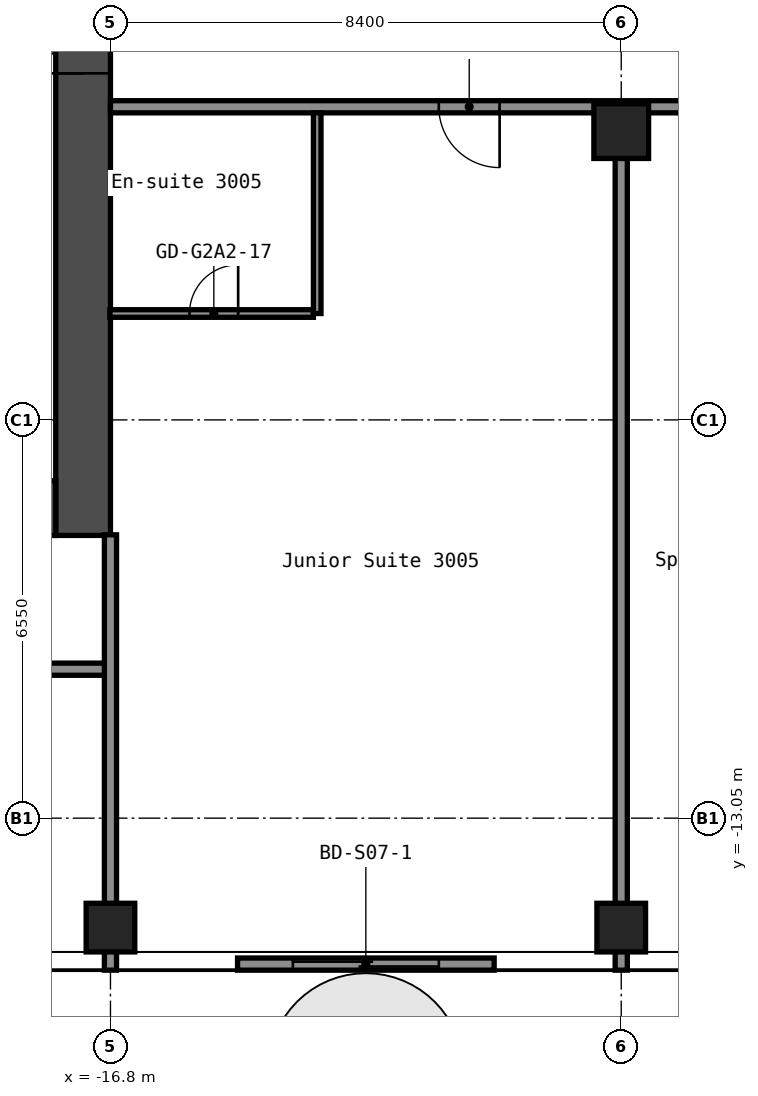
"""IFC4 building model, lengths in metres.
Left out: names, types, materials, properties, quantities, classifications, styles, units other than length and angle.
Written with IfcOpenShell. Run it as: python <this file> out.ifc"""

import sys

from ifc_helpers import new_model, si_unit, direction, frame, frame_2d, origin, origin_2d, place, context, subcontext, project, spatial, rectangle, hollow_rectangle, extrude, element, fill, save


model = new_model("IFC4")
c1 = context("Model", 3, precision=1e-05, world=origin(), true_north=direction((0.0, 1.0)))
c2 = subcontext(c1, "Body", "Model", "MODEL_VIEW")
j1 = project(units=[si_unit("LENGTHUNIT", "METRE"), si_unit("PLANEANGLEUNIT", "RADIAN")], contexts=[c1])
p1 = place(None, origin())
s1 = spatial("IfcSite", under=j1, at=p1, CompositionType="ELEMENT")
p2 = place(p1, origin())
s2 = spatial("IfcBuilding", under=s1, at=p2, CompositionType="ELEMENT")
p3 = place(p2, frame((0.0, 0.0, 107.4)))
s3 = spatial("IfcBuildingStorey", under=s2, at=p3, CompositionType="ELEMENT", Elevation=107.4)
for number, where, z_axis, x_axis in (
    (1, (-16.8, -14.85, 0.0), (0.0, 0.0, 1.0), (1.0, 0.0, 0.0)),
    (2, (-8.4, -14.85, 0.0), (0.0, 0.0, 1.0), (1.0, 0.0, 0.0)),
):
    element("IfcColumn", number, at=place(p3, frame(where, z_axis=z_axis, x_axis=x_axis)), inside=s3, PredefinedType="COLUMN", context=c2, shape_type="SweptSolid", body=[
        extrude(hollow_rectangle(XDim=0.8, YDim=0.8, WallThickness=0.032, at=origin_2d()), origin(), (0.0, 0.0, 1.0), 2.8),
    ])
p4 = place(p3, frame((-8.4, -1.75, 0.0), z_axis=(0.0, 0.0, 1.0), x_axis=(1.0, 0.0, 0.0)))
e3 = element("IfcColumn", 3, at=p4, inside=s3, PredefinedType="COLUMN", context=c2, shape_type="SweptSolid", body=[
    extrude(hollow_rectangle(XDim=0.9, YDim=0.9, WallThickness=0.036, at=origin_2d()), origin(), (0.0, 0.0, 1.0), 2.8),
])
p5 = place(p3, frame((-17.25, -8.4, 0.0), z_axis=(0.0, 0.0, 1.0), x_axis=(0.0, 1.0, 0.0)))
e4 = element("IfcWall", 4, at=p5, inside=s3, PredefinedType="SHEAR", context=c2, shape_type="SweptSolid", body=[
    extrude(rectangle(XDim=16.8, YDim=0.9, at=frame_2d((8.4, 0.0))), origin(), (0.0, 0.0, 1.0), 2.8),
])
p6 = place(p5, frame((7.6, 0.0, 0.0)))
e5 = element("IfcOpeningElement", 5, at=p6, cuts=e4, PredefinedType="OPENING", context=c2, shape_type="SweptSolid", body=[
    extrude(rectangle(XDim=1.2, YDim=2.1, at=frame_2d((0.6, 1.05))), frame((0.0, 0.46, 0.0), z_axis=(0.0, -1.0, 0.0), x_axis=(1.0, 0.0, 0.0)), (0.0, 0.0, 1.0), 0.92),
])
p7 = place(p3, frame((-32.7, -7.95, 0.0), z_axis=(0.0, 0.0, 1.0), x_axis=(1.0, 0.0, 0.0)))
e6 = element("IfcWall", 6, at=p7, inside=s3, PredefinedType="SHEAR", context=c2, shape_type="SweptSolid", body=[
    extrude(rectangle(XDim=15.0, YDim=0.9, at=frame_2d((7.5, 0.0))), origin(), (0.0, 0.0, 1.0), 2.8),
])
p8 = place(p7, frame((11.45, 0.0, 0.0)))
e7 = element("IfcOpeningElement", 7, at=p8, cuts=e6, PredefinedType="OPENING", context=c2, shape_type="SweptSolid", body=[
    extrude(rectangle(XDim=1.0, YDim=2.1, at=frame_2d((0.5, 1.05))), frame((0.0, 0.46, 0.0), z_axis=(0.0, -1.0, 0.0), x_axis=(1.0, 0.0, 0.0)), (0.0, 0.0, 1.0), 0.92),
])
p9 = place(p3, frame((-46.5, -10.6, 0.0), z_axis=(0.0, 0.0, 1.0), x_axis=(1.0, 0.0, 0.0)))
e8 = element("IfcWall", 8, at=p9, inside=s3, PredefinedType="PARTITIONING", context=c2, shape_type="SweptSolid", body=[
    extrude(rectangle(XDim=29.7, YDim=0.2, at=frame_2d((14.85, 0.0))), origin(), (0.0, 0.0, 1.0), 2.8),
])
p10 = place(p9, frame((1.95, 0.0, 0.0)))
e9 = element("IfcOpeningElement", 9, at=p10, cuts=e8, PredefinedType="OPENING", context=c2, shape_type="SweptSolid", body=[
    extrude(rectangle(XDim=0.9, YDim=2.1, at=frame_2d((0.45, 1.05))), frame((0.0, 0.11, 0.0), z_axis=(0.0, -1.0, 0.0), x_axis=(1.0, 0.0, 0.0)), (0.0, 0.0, 1.0), 0.22),
])
p11 = place(p9, frame((6.74, 0.0, 0.0)))
e10 = element("IfcOpeningElement", 10, at=p11, cuts=e8, PredefinedType="OPENING", context=c2, shape_type="SweptSolid", body=[
    extrude(rectangle(XDim=0.9, YDim=2.1, at=frame_2d((0.45, 1.05))), frame((0.0, 0.11, 0.0), z_axis=(0.0, -1.0, 0.0), x_axis=(1.0, 0.0, 0.0)), (0.0, 0.0, 1.0), 0.22),
])
p12 = place(p9, frame((10.94, 0.0, 0.0)))
e11 = element("IfcOpeningElement", 11, at=p12, cuts=e8, PredefinedType="OPENING", context=c2, shape_type="SweptSolid", body=[
    extrude(rectangle(XDim=0.9, YDim=2.1, at=frame_2d((0.45, 1.05))), frame((0.0, 0.11, 0.0), z_axis=(0.0, -1.0, 0.0), x_axis=(1.0, 0.0, 0.0)), (0.0, 0.0, 1.0), 0.22),
])
p13 = place(p9, frame((15.055, 0.0, 0.0)))
e12 = element("IfcOpeningElement", 12, at=p13, cuts=e8, PredefinedType="OPENING", context=c2, shape_type="SweptSolid", body=[
    extrude(rectangle(XDim=0.9, YDim=2.1, at=frame_2d((0.45, 1.05))), frame((0.0, 0.11, 0.0), z_axis=(0.0, -1.0, 0.0), x_axis=(1.0, 0.0, 0.0)), (0.0, 0.0, 1.0), 0.22),
])
p14 = place(p9, frame((19.255, 0.0, 0.0)))
e13 = element("IfcOpeningElement", 13, at=p14, cuts=e8, PredefinedType="OPENING", context=c2, shape_type="SweptSolid", body=[
    extrude(rectangle(XDim=0.9, YDim=2.1, at=frame_2d((0.45, 1.05))), frame((0.0, 0.11, 0.0), z_axis=(0.0, -1.0, 0.0), x_axis=(1.0, 0.0, 0.0)), (0.0, 0.0, 1.0), 0.22),
])
p15 = place(p9, frame((25.0, 0.0, 0.0)))
e14 = element("IfcOpeningElement", 14, at=p15, cuts=e8, PredefinedType="OPENING", context=c2, shape_type="SweptSolid", body=[
    extrude(rectangle(XDim=1.0, YDim=2.1, at=frame_2d((0.5, 1.05))), frame((0.0, 0.11, 0.0), z_axis=(0.0, -1.0, 0.0), x_axis=(1.0, 0.0, 0.0)), (0.0, 0.0, 1.0), 0.22),
])
p16 = place(p3, frame((-16.81, -4.75, 0.0), z_axis=(0.0, 0.0, 1.0), x_axis=(1.0, 0.0, 0.0)))
e15 = element("IfcWall", 15, at=p16, inside=s3, PredefinedType="PARTITIONING", context=c2, shape_type="SweptSolid", body=[
    extrude(rectangle(XDim=3.348, YDim=0.125, at=frame_2d((1.674, 0.0))), origin(), (0.0, 0.0, 1.0), 2.8),
])
p17 = place(p16, frame((1.31, 0.0, 0.0)))
e16 = element("IfcOpeningElement", 16, at=p17, cuts=e15, PredefinedType="OPENING", context=c2, shape_type="SweptSolid", body=[
    extrude(rectangle(XDim=0.8, YDim=2.1, at=frame_2d((0.4, 1.05))), frame((0.0, 0.073, 0.0), z_axis=(0.0, -1.0, 0.0), x_axis=(1.0, 0.0, 0.0)), (0.0, 0.0, 1.0), 0.145),
])
p18 = place(p3, frame((-16.8, -1.35, 0.0), z_axis=(0.0, 0.0, 1.0), x_axis=(1.0, 0.0, 0.0)))
e17 = element("IfcWall", 17, at=p18, inside=s3, PredefinedType="PARTITIONING", context=c2, shape_type="SweptSolid", body=[
    extrude(rectangle(XDim=33.6, YDim=0.2, at=frame_2d((16.8, 0.0))), origin(), (0.0, 0.0, 1.0), 2.8),
])
p19 = place(p18, frame((5.4, 0.0, 0.0)))
e18 = element("IfcOpeningElement", 18, at=p19, cuts=e17, PredefinedType="OPENING", context=c2, shape_type="SweptSolid", body=[
    extrude(rectangle(XDim=1.0, YDim=2.1, at=frame_2d((0.5, 1.05))), frame((0.0, 0.11, 0.0), z_axis=(0.0, -1.0, 0.0), x_axis=(1.0, 0.0, 0.0)), (0.0, 0.0, 1.0), 0.22),
])
p20 = place(p18, frame((9.46, 0.0, 0.0)))
e19 = element("IfcOpeningElement", 19, at=p20, cuts=e17, PredefinedType="OPENING", context=c2, shape_type="SweptSolid", body=[
    extrude(rectangle(XDim=0.9, YDim=2.1, at=frame_2d((0.45, 1.05))), frame((0.0, 0.11, 0.0), z_axis=(0.0, -1.0, 0.0), x_axis=(1.0, 0.0, 0.0)), (0.0, 0.0, 1.0), 0.22),
])
p21 = place(p18, frame((13.66, 0.0, 0.0)))
e20 = element("IfcOpeningElement", 20, at=p21, cuts=e17, PredefinedType="OPENING", context=c2, shape_type="SweptSolid", body=[
    extrude(rectangle(XDim=0.9, YDim=2.1, at=frame_2d((0.45, 1.05))), frame((0.0, 0.11, 0.0), z_axis=(0.0, -1.0, 0.0), x_axis=(1.0, 0.0, 0.0)), (0.0, 0.0, 1.0), 0.22),
])
p22 = place(p18, frame((18.8, 0.0, 0.0)))
e21 = element("IfcOpeningElement", 21, at=p22, cuts=e17, PredefinedType="OPENING", context=c2, shape_type="SweptSolid", body=[
    extrude(rectangle(XDim=1.0, YDim=2.1, at=frame_2d((0.5, 1.05))), frame((0.0, 0.11, 0.0), z_axis=(0.0, -1.0, 0.0), x_axis=(1.0, 0.0, 0.0)), (0.0, 0.0, 1.0), 0.22),
])
p23 = place(p18, frame((30.6, 0.0, 0.0)))
e22 = element("IfcOpeningElement", 22, at=p23, cuts=e17, PredefinedType="OPENING", context=c2, shape_type="SweptSolid", body=[
    extrude(rectangle(XDim=1.0, YDim=2.1, at=frame_2d((0.5, 1.05))), frame((0.0, 0.11, 0.0), z_axis=(0.0, -1.0, 0.0), x_axis=(1.0, 0.0, 0.0)), (0.0, 0.0, 1.0), 0.22),
])
p24 = place(p3, frame((-16.8, -15.55, 0.0), z_axis=(0.0, 0.0, 1.0), x_axis=(0.0, 1.0, 0.0)))
e23 = element("IfcWall", 23, at=p24, inside=s3, PredefinedType="PARTITIONING", context=c2, shape_type="SweptSolid", body=[
    extrude(rectangle(XDim=7.16, YDim=0.2, at=frame_2d((3.58, 0.0))), origin(), (0.0, 0.0, 1.0), 2.8),
])
p25 = place(p3, frame((-13.4, -4.75, 0.0), z_axis=(0.0, 0.0, 1.0), x_axis=(0.0, 1.0, 0.0)))
e24 = element("IfcWall", 24, at=p25, inside=s3, PredefinedType="PARTITIONING", context=c2, shape_type="SweptSolid", body=[
    extrude(rectangle(XDim=3.3, YDim=0.125, at=frame_2d((1.65, 0.0))), origin(), (0.0, 0.0, 1.0), 2.8),
])
p26 = place(p3, frame((-8.4, -15.55, 0.0), z_axis=(0.0, 0.0, 1.0), x_axis=(0.0, 1.0, 0.0)))
e25 = element("IfcWall", 25, at=p26, inside=s3, PredefinedType="PARTITIONING", context=c2, shape_type="SweptSolid", body=[
    extrude(rectangle(XDim=13.36, YDim=0.2, at=frame_2d((6.68, 0.0))), origin(), (0.0, 0.0, 1.0), 2.8),
])
p27 = place(p3, frame((-14.71, -15.45, 0.0), z_axis=(0.0, 0.0, 1.0), x_axis=(1.0, 0.0, 0.0)))
p28 = place(p27, frame((0.91, 0.0, 0.0)))
p29 = place(p28, frame((2.4, 0.0, 0.0), z_axis=(0.0, 0.0, 1.0), x_axis=(-1.0, 0.0, 0.0)))
e26 = element("IfcDoor", 26, at=p29, inside=s3, OperationType="SLIDING_TO_LEFT", PredefinedType="DOOR", context=c2, shape_type="SweptSolid", body=[
    extrude(rectangle(XDim=2.4, YDim=2.2, at=frame_2d((1.2, 1.1))), frame((0.0, 0.025, 0.0), z_axis=(0.0, -1.0, 0.0), x_axis=(1.0, 0.0, 0.0)), (0.0, 0.0, 1.0), 0.05),
])
p30 = place(p6, origin())
e27 = element("IfcDoor", 27, at=p30, inside=s3, OperationType="DOUBLE_DOOR_SINGLE_SWING", PredefinedType="DOOR", context=c2, shape_type="SweptSolid", body=[
    extrude(rectangle(XDim=1.2, YDim=2.1, at=frame_2d((0.6, 1.05))), frame((0.0, 0.025, 0.0), z_axis=(0.0, -1.0, 0.0), x_axis=(1.0, 0.0, 0.0)), (0.0, 0.0, 1.0), 0.05),
])
fill(e5, e27)
p31 = place(p17, origin())
e28 = element("IfcDoor", 28, at=p31, inside=s3, OperationType="SINGLE_SWING_LEFT", PredefinedType="DOOR", context=c2, shape_type="SweptSolid", body=[
    extrude(rectangle(XDim=0.8, YDim=2.1, at=frame_2d((0.4, 1.05))), frame((0.0, 0.025, 0.0), z_axis=(0.0, -1.0, 0.0), x_axis=(1.0, 0.0, 0.0)), (0.0, 0.0, 1.0), 0.05),
])
fill(e16, e28)
p32 = place(p19, origin())
e29 = element("IfcDoor", 29, at=p32, inside=s3, OperationType="SINGLE_SWING_RIGHT", PredefinedType="DOOR", context=c2, shape_type="SweptSolid", body=[
    extrude(rectangle(XDim=1.0, YDim=2.1, at=frame_2d((0.5, 1.05))), frame((0.0, 0.025, 0.0), z_axis=(0.0, -1.0, 0.0), x_axis=(1.0, 0.0, 0.0)), (0.0, 0.0, 1.0), 0.05),
])
fill(e18, e29)
save(model, sys.argv[1])
